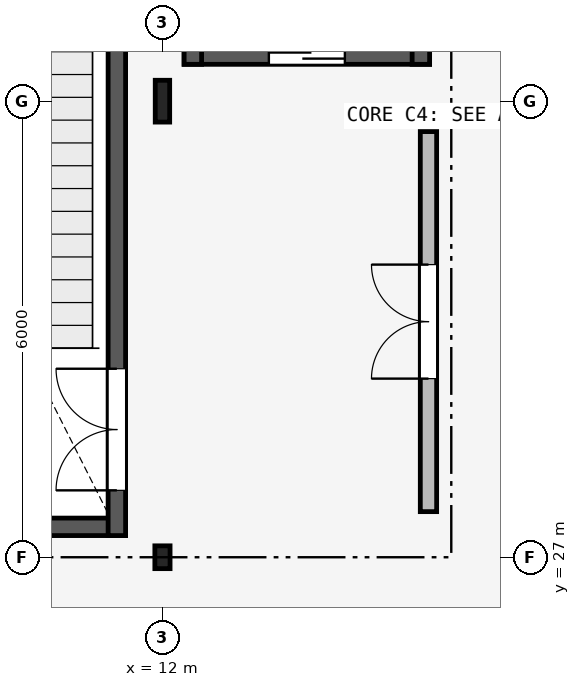
"""IFC4 building model, lengths in metres.
Left out: names, types, materials, properties, quantities, classifications, styles, units other than length and angle.
Written with IfcOpenShell. Run it as: python <this file> out.ifc"""

import sys

from ifc_helpers import new_model, si_unit, direction, frame, frame_2d, origin, origin_2d, place, context, subcontext, project, spatial, rectangle, hollow_rectangle, i_section, extrude, element, fill, save


model = new_model("IFC4")
c1 = context("Model", 3, precision=1e-05, world=origin(), true_north=direction((0.0, 1.0)))
c2 = subcontext(c1, "Body", "Model", "MODEL_VIEW")
j1 = project(units=[si_unit("LENGTHUNIT", "METRE"), si_unit("PLANEANGLEUNIT", "RADIAN")], contexts=[c1])
p1 = place(None, origin())
s1 = spatial("IfcSite", under=j1, at=p1, CompositionType="ELEMENT")
p2 = place(p1, origin())
s2 = spatial("IfcBuilding", under=s1, at=p2, CompositionType="ELEMENT")
p3 = place(p2, frame((0.0, 0.0, 9.3)))
s3 = spatial("IfcBuildingStorey", under=s2, at=p3, CompositionType="ELEMENT", Elevation=9.3)
p4 = place(p3, frame((12.0, 27.0, 0.0), z_axis=(0.0, 0.0, 1.0), x_axis=(1.0, 0.0, 0.0)))
e1 = element("IfcColumn", 1, at=p4, inside=s3, PredefinedType="COLUMN", context=c2, shape_type="SweptSolid", body=[
    extrude(hollow_rectangle(XDim=0.2, YDim=0.3, WallThickness=0.012, InnerFilletRadius=0.012, OuterFilletRadius=0.024, at=origin_2d()), origin(), (0.0, 0.0, 1.0), 4.2),
])
p5 = place(p3, frame((12.0, 33.0, 0.0), z_axis=(0.0, 0.0, 1.0), x_axis=(1.0, 0.0, 0.0)))
e2 = element("IfcColumn", 2, at=p5, inside=s3, PredefinedType="COLUMN", context=c2, shape_type="SweptSolid", body=[
    extrude(i_section(OverallWidth=0.19, OverallDepth=0.55, WebThickness=0.011, FlangeThickness=0.019, FilletRadius=0.018, at=origin_2d()), origin(), (0.0, 0.0, 1.0), 4.2),
])
p6 = place(p3, frame((6.485, 27.4, 0.0), z_axis=(0.0, 0.0, 1.0), x_axis=(1.0, 0.0, 0.0)))
e3 = element("IfcWall", 3, at=p6, inside=s3, PredefinedType="SHEAR", context=c2, shape_type="SweptSolid", body=[
    extrude(rectangle(XDim=5.03, YDim=0.23, at=frame_2d((2.515, 0.0))), origin(), (0.0, 0.0, 1.0), 4.06),
])
p7 = place(p3, frame((11.4, 27.285, 0.0), z_axis=(0.0, 0.0, 1.0), x_axis=(0.0, 1.0, 0.0)))
e4 = element("IfcWall", 4, at=p7, inside=s3, PredefinedType="SHEAR", context=c2, shape_type="SweptSolid", body=[
    extrude(rectangle(XDim=9.63, YDim=0.23, at=frame_2d((4.815, 0.0))), origin(), (0.0, 0.0, 1.0), 4.06),
])
p8 = place(p7, frame((0.595, 0.0, 0.0)))
e5 = element("IfcOpeningElement", 5, at=p8, cuts=e4, PredefinedType="OPENING", context=c2, shape_type="SweptSolid", body=[
    extrude(rectangle(XDim=1.6, YDim=2.2, at=frame_2d((0.8, 1.1))), frame((0.0, 0.125, 0.0), z_axis=(0.0, -1.0, 0.0), x_axis=(1.0, 0.0, 0.0)), (0.0, 0.0, 1.0), 0.25),
])
p9 = place(p3, frame((15.5, 27.6, 0.0), z_axis=(0.0, 0.0, 1.0), x_axis=(0.0, 1.0, 0.0)))
e6 = element("IfcWall", 6, at=p9, inside=s3, PredefinedType="PARTITIONING", context=c2, shape_type="SweptSolid", body=[
    extrude(rectangle(XDim=5.0, YDim=0.215, at=frame_2d((2.5, 0.0))), origin(), (0.0, 0.0, 1.0), 3.89),
])
p10 = place(p9, frame((1.75, 0.0, 0.0)))
e7 = element("IfcOpeningElement", 7, at=p10, cuts=e6, PredefinedType="OPENING", context=c2, shape_type="SweptSolid", body=[
    extrude(rectangle(XDim=1.5, YDim=2.15, at=frame_2d((0.75, 1.075))), frame((0.0, 0.117, 0.0), z_axis=(0.0, -1.0, 0.0), x_axis=(1.0, 0.0, 0.0)), (0.0, 0.0, 1.0), 0.235),
])
p11 = place(p3, frame((12.285, 33.6, 0.0), z_axis=(0.0, 0.0, 1.0), x_axis=(1.0, 0.0, 0.0)))
e8 = element("IfcWall", 8, at=p11, inside=s3, PredefinedType="SHEAR", context=c2, shape_type="SweptSolid", body=[
    extrude(rectangle(XDim=3.23, YDim=0.23, at=frame_2d((1.615, 0.0))), origin(), (0.0, 0.0, 1.0), 4.2),
])
p12 = place(p11, frame((1.115, 0.0, 0.0)))
e9 = element("IfcOpeningElement", 9, at=p12, cuts=e8, PredefinedType="OPENING", context=c2, shape_type="SweptSolid", body=[
    extrude(rectangle(XDim=1.0, YDim=2.15, at=frame_2d((0.5, 1.075))), frame((0.0, 0.125, 0.0), z_axis=(0.0, -1.0, 0.0), x_axis=(1.0, 0.0, 0.0)), (0.0, 0.0, 1.0), 0.25),
])
for number, where, z_axis, x_axis in (
    (10, (15.4, 33.485, 0.0), (0.0, 0.0, 1.0), (0.0, 1.0, 0.0)),
    (11, (12.4, 37.115, 0.0), (0.0, 0.0, 1.0), (0.0, -1.0, 0.0)),
):
    element("IfcWall", number, at=place(p3, frame(where, z_axis=z_axis, x_axis=x_axis)), inside=s3, PredefinedType="SHEAR", context=c2, shape_type="SweptSolid", body=[
        extrude(rectangle(XDim=3.63, YDim=0.23, at=frame_2d((1.815, 0.0))), origin(), (0.0, 0.0, 1.0), 4.2),
    ])
p13 = place(p8, origin())
e12 = element("IfcDoor", 12, at=p13, inside=s3, OperationType="DOUBLE_DOOR_SINGLE_SWING", PredefinedType="DOOR", context=c2, shape_type="SweptSolid", body=[
    extrude(rectangle(XDim=1.6, YDim=2.2, at=frame_2d((0.8, 1.1))), frame((0.0, 0.025, 0.0), z_axis=(0.0, -1.0, 0.0), x_axis=(1.0, 0.0, 0.0)), (0.0, 0.0, 1.0), 0.05),
])
fill(e5, e12)
p14 = place(p10, origin())
e13 = element("IfcDoor", 13, at=p14, inside=s3, OperationType="DOUBLE_DOOR_SINGLE_SWING", PredefinedType="DOOR", context=c2, shape_type="SweptSolid", body=[
    extrude(rectangle(XDim=1.5, YDim=2.15, at=frame_2d((0.75, 1.075))), frame((0.0, 0.025, 0.0), z_axis=(0.0, -1.0, 0.0), x_axis=(1.0, 0.0, 0.0)), (0.0, 0.0, 1.0), 0.05),
])
fill(e7, e13)
p15 = place(p12, origin())
e14 = element("IfcDoor", 14, at=p15, inside=s3, OperationType="SLIDING_TO_LEFT", PredefinedType="DOOR", context=c2, shape_type="SweptSolid", body=[
    extrude(rectangle(XDim=1.0, YDim=2.15, at=frame_2d((0.5, 1.075))), frame((0.0, 0.025, 0.0), z_axis=(0.0, -1.0, 0.0), x_axis=(1.0, 0.0, 0.0)), (0.0, 0.0, 1.0), 0.05),
])
fill(e9, e14)
save(model, sys.argv[1])
